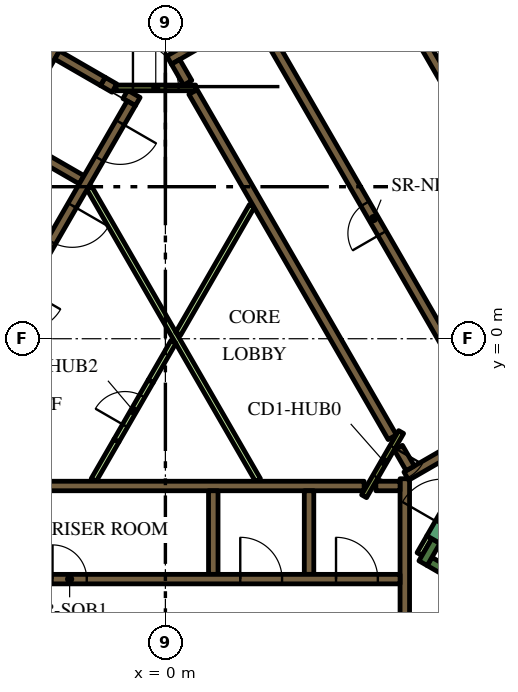
"""IFC4 building model, lengths in metres.
Left out: names, types, materials, properties, quantities, classifications, styles, units other than length and angle.
Written with IfcOpenShell. Run it as: python <this file> out.ifc"""

import sys

from ifc_helpers import new_model, si_unit, direction, frame, frame_2d, origin, place, context, subcontext, project, spatial, polyline, rectangle, outline, extrude, element, fill, save


model = new_model("IFC4")
c1 = context("Model", 3, precision=1e-05, world=origin(), true_north=direction((0.0, 1.0)))
c2 = subcontext(c1, "Body", "Model", "MODEL_VIEW")
j1 = project(units=[si_unit("LENGTHUNIT", "METRE"), si_unit("PLANEANGLEUNIT", "RADIAN")], contexts=[c1])
p1 = place(None, origin())
s1 = spatial("IfcSite", under=j1, at=p1, CompositionType="ELEMENT")
p2 = place(p1, origin())
s2 = spatial("IfcBuilding", under=s1, at=p2, CompositionType="ELEMENT")
p3 = place(p2, frame((0.0, 0.0, 122.7)))
s3 = spatial("IfcBuildingStorey", under=s2, at=p3, CompositionType="ELEMENT", Elevation=122.7)
p4 = place(p3, frame((6.776, 13.364, 0.0), z_axis=(0.0, 0.0, 1.0), x_axis=(0.500004177138, -0.8660229921, 0.0)))
e1 = element("IfcWall", 1, at=p4, inside=s3, PredefinedType="SOLIDWALL", context=c2, shape_type="SweptSolid", body=[
    extrude(rectangle(XDim=20.204, YDim=0.9, at=frame_2d((10.102, 0.0))), origin(), (0.0, 0.0, 1.0), 3.9),
])
p5 = place(p3, frame((12.84, -9.261, 0.0), z_axis=(0.0, 0.0, 1.0), x_axis=(-0.866013990052, 0.500019768644, 0.0)))
e2 = element("IfcWall", 2, at=p5, inside=s3, PredefinedType="SOLIDWALL", context=c2, shape_type="SweptSolid", body=[
    extrude(rectangle(XDim=6.8, YDim=0.25, at=frame_2d((3.4, 0.0))), origin(), (0.0, 0.0, 1.0), 3.9),
])
p6 = place(p3, frame((6.78, -5.906, 0.0), z_axis=(0.0, 0.0, 1.0), x_axis=(0.500223362819, 0.865896406789, 0.0)))
e3 = element("IfcWall", 3, at=p6, inside=s3, PredefinedType="SOLIDWALL", context=c2, shape_type="SweptSolid", body=[
    extrude(rectangle(XDim=0.675, YDim=0.25, at=frame_2d((0.337, 0.0))), origin(), (0.0, 0.0, 1.0), 3.9),
])
p7 = place(p3, frame((-5.259, -3.875, 0.0), z_axis=(0.0, 0.0, 1.0), x_axis=(1.0, 0.0, 0.0)))
e4 = element("IfcWall", 4, at=p7, inside=s3, PredefinedType="SOLIDWALL", context=c2, shape_type="SweptSolid", body=[
    extrude(rectangle(XDim=10.489, YDim=0.25, at=frame_2d((5.244, 0.0))), origin(), (0.0, 0.0, 1.0), 3.9),
])
for number, where, z_axis, x_axis in (
    (5, (3.78, -4.0, 0.0), (0.0, 0.0, 1.0), (0.0, -1.0, 0.0)),
    (6, (1.26, -4.0, 0.0), (0.0, 0.0, 1.0), (0.0, -1.0, 0.0)),
):
    element("IfcWall", number, at=place(p3, frame(where, z_axis=z_axis, x_axis=x_axis)), inside=s3, PredefinedType="SOLIDWALL", context=c2, shape_type="SweptSolid", body=[
        extrude(rectangle(XDim=2.2, YDim=0.25, at=frame_2d((1.1, 0.0))), origin(), (0.0, 0.0, 1.0), 3.9),
    ])
p8 = place(p3, frame((6.3, -7.27, 0.0), z_axis=(0.0, 0.0, 1.0), x_axis=(0.0, 1.0, 0.0)))
e7 = element("IfcWall", 7, at=p8, inside=s3, PredefinedType="SOLIDWALL", context=c2, shape_type="SweptSolid", body=[
    extrude(rectangle(XDim=3.586, YDim=0.25, at=frame_2d((1.793, 0.0))), origin(), (0.0, 0.0, 1.0), 3.9),
])
p9 = place(p3, frame((5.538, -3.875, 0.0), z_axis=(0.0, 0.0, 1.0), x_axis=(1.0, 0.0, 0.0)))
e8 = element("IfcWall", 8, at=p9, inside=s3, PredefinedType="SOLIDWALL", context=c2, shape_type="SweptSolid", body=[
    extrude(rectangle(XDim=0.637, YDim=0.25, at=frame_2d((0.318, 0.0))), origin(), (0.0, 0.0, 1.0), 3.9),
])
p10 = place(p3, frame((9.346, -1.879, 0.0), z_axis=(0.0, 0.0, 1.0), x_axis=(-0.866048528039, -0.499959945477, 0.0)))
e9 = element("IfcWall", 9, at=p10, inside=s3, PredefinedType="SOLIDWALL", context=c2, shape_type="SweptSolid", body=[
    extrude(rectangle(XDim=3.47, YDim=0.25, at=frame_2d((1.735, 0.0))), origin(), (0.0, 0.0, 1.0), 3.9),
])
p11 = place(p3, frame((6.13, -2.867, 0.0), z_axis=(0.0, 0.0, 1.0), x_axis=(0.500160776593, -0.865932559475, 0.0)))
e10 = element("IfcWall", 10, at=p11, inside=s3, PredefinedType="SOLIDWALL", context=c2, shape_type="SweptSolid", body=[
    extrude(rectangle(XDim=0.627, YDim=0.25, at=frame_2d((0.313, 0.0))), origin(), (0.0, 0.0, 1.0), 3.9),
])
p12 = place(p3, origin())
e11 = element("IfcWall", 11, at=p12, inside=s3, PredefinedType="SOLIDWALL", context=c2, shape_type="SweptSolid", body=[
    extrude(outline(polyline([(2.776, 8.733), (2.499, 8.573), (2.498, 8.573), (2.498, 8.573), (2.282, 8.448), (2.282, 8.448), (0.377, 7.348), (0.16, 7.223), (0.035, 7.439), (3.032, 9.169), (3.03, 9.152), (3.03, 9.133), (3.031, 9.113), (3.035, 9.094), (3.04, 9.075), (3.047, 9.057), (3.056, 9.039), (3.119, 8.931), (2.776, 8.733)])), origin(), (0.0, 0.0, 1.0), 3.9),
])
p13 = place(p3, frame((0.268, 7.285, 0.0), z_axis=(0.0, 0.0, 1.0), x_axis=(0.500098681536, -0.865968422476, 0.0)))
e12 = element("IfcWall", 12, at=p13, inside=s3, PredefinedType="SOLIDWALL", context=c2, shape_type="SweptSolid", body=[
    extrude(rectangle(XDim=0.636, YDim=0.25, at=frame_2d((0.318, 0.0))), origin(), (0.0, 0.0, 1.0), 3.9),
])
p14 = place(p3, frame((5.97, -2.591, 0.0), z_axis=(0.0, 0.0, 1.0), x_axis=(-0.499994469932, 0.866028596547, 0.0)))
e13 = element("IfcWall", 13, at=p14, inside=s3, PredefinedType="SOLIDWALL", context=c2, shape_type="SweptSolid", body=[
    extrude(rectangle(XDim=10.488, YDim=0.25, at=frame_2d((5.244, 0.0))), origin(), (0.0, 0.0, 1.0), 3.9),
])
p15 = place(p3, frame((-8.06, -1.311, 0.0), z_axis=(0.0, 0.0, 1.0), x_axis=(0.50000273126, 0.866023826885, 0.0)))
e14 = element("IfcWall", 14, at=p15, inside=s3, PredefinedType="SOLIDWALL", context=c2, shape_type="SweptSolid", body=[
    extrude(rectangle(XDim=10.33, YDim=0.25, at=frame_2d((5.165, 0.0))), origin(), (0.0, 0.0, 1.0), 3.9),
])
p16 = place(p3, frame((-1.342, 6.595, 0.0), z_axis=(0.0, 0.0, 1.0), x_axis=(-0.866046247233, 0.49996389635, 0.0)))
e15 = element("IfcWall", 15, at=p16, inside=s3, PredefinedType="SOLIDWALL", context=c2, shape_type="SweptSolid", body=[
    extrude(rectangle(XDim=0.35, YDim=0.25, at=frame_2d((0.175, 0.0))), origin(), (0.0, 0.0, 1.0), 3.9),
])
p17 = place(p3, frame((-1.647, 6.771, 0.0), z_axis=(0.0, 0.0, 1.0), x_axis=(-0.865971728693, 0.500092956464, 0.0)))
e16 = element("IfcWall", 16, at=p17, inside=s3, PredefinedType="SOLIDWALL", context=c2, shape_type="SweptSolid", body=[
    extrude(rectangle(XDim=1.388, YDim=0.25, at=frame_2d((0.694, 0.0))), origin(), (0.0, 0.0, 1.0), 3.9),
])
p18 = place(p3, frame((-0.728, 6.24, 0.0), z_axis=(0.0, 0.0, 1.0), x_axis=(-0.866088799389, 0.499890179513, 0.0)))
e17 = element("IfcWall", 17, at=p18, inside=s3, PredefinedType="SOLIDWALL", context=c2, shape_type="SweptSolid", body=[
    extrude(rectangle(XDim=0.378, YDim=0.25, at=frame_2d((0.189, 0.0))), origin(), (0.0, 0.0, 1.0), 3.9),
])
p19 = place(p3, frame((-2.204, 4.182, 0.0), z_axis=(0.0, 0.0, 1.0), x_axis=(-0.866008176907, 0.50002983664, 0.0)))
e18 = element("IfcWall", 18, at=p19, inside=s3, PredefinedType="SOLIDWALL", context=c2, shape_type="SweptSolid", body=[
    extrude(rectangle(XDim=2.2, YDim=0.25, at=frame_2d((1.1, 0.0))), origin(), (0.0, 0.0, 1.0), 3.9),
])
p20 = place(p3, frame((-1.887, -3.718, 0.0), z_axis=(0.0, 0.0, 1.0), x_axis=(0.500057179532, 0.865992388649, 0.0)))
e19 = element("IfcWall", 19, at=p20, inside=s3, PredefinedType="PARTITIONING", context=c2, shape_type="SweptSolid", body=[
    extrude(rectangle(XDim=1.199, YDim=0.15, at=frame_2d((0.6, 0.0))), origin(), (0.0, 0.0, 1.0), 2.75),
])
p21 = place(p3, frame((6.945, -5.222, 0.0), z_axis=(0.0, 0.0, 1.0), x_axis=(-0.499818422106, -0.866130212453, 0.0)))
e20 = element("IfcWall", 20, at=p21, inside=s3, PredefinedType="PARTITIONING", context=c2, shape_type="SweptSolid", body=[
    extrude(rectangle(XDim=0.514, YDim=0.15, at=frame_2d((0.257, 0.0))), origin(), (0.0, 0.0, 1.0), 2.75),
])
p22 = place(p3, frame((2.435, -3.718, 0.0), z_axis=(0.0, 0.0, 1.0), x_axis=(-0.499985176046, 0.866033962229, 0.0)))
e21 = element("IfcWall", 21, at=p22, inside=s3, PredefinedType="PARTITIONING", context=c2, shape_type="SweptSolid", body=[
    extrude(rectangle(XDim=8.875, YDim=0.15, at=frame_2d((4.438, 0.0))), origin(), (0.0, 0.0, 1.0), 2.75),
])
p23 = place(p3, frame((0.336, 0.132, 0.0), z_axis=(0.0, 0.0, 1.0), x_axis=(0.500001957507, 0.866024273614, 0.0)))
e22 = element("IfcWall", 22, at=p23, inside=s3, PredefinedType="PARTITIONING", context=c2, shape_type="SweptSolid", body=[
    extrude(rectangle(XDim=3.881, YDim=0.15, at=frame_2d((1.941, 0.0))), origin(), (0.0, 0.0, 1.0), 2.75),
])
p24 = place(p3, frame((-0.387, -1.121, 0.0), z_axis=(0.0, 0.0, 1.0), x_axis=(0.500057179532, 0.865992388649, 0.0)))
e23 = element("IfcWall", 23, at=p24, inside=s3, PredefinedType="PARTITIONING", context=c2, shape_type="SweptSolid", body=[
    extrude(rectangle(XDim=1.199, YDim=0.15, at=frame_2d((0.6, 0.0))), origin(), (0.0, 0.0, 1.0), 2.75),
])
p25 = place(p3, frame((-6.175, -6.325, 0.0), z_axis=(0.0, 0.0, 1.0), x_axis=(1.0, 0.0, 0.0)))
e24 = element("IfcWall", 24, at=p25, inside=s3, PredefinedType="SOLIDWALL", context=c2, shape_type="SweptSolid", body=[
    extrude(rectangle(XDim=12.35, YDim=0.25, at=frame_2d((6.175, 0.0))), origin(), (0.0, 0.0, 1.0), 3.9),
])
p26 = place(p25, frame((3.205, 0.0, 0.0)))
e25 = element("IfcOpeningElement", 25, at=p26, cuts=e24, PredefinedType="OPENING", context=c2, shape_type="SweptSolid", body=[
    extrude(rectangle(XDim=0.9, YDim=2.1, at=frame_2d((0.45, 1.05))), frame((0.0, 0.135, 0.0), z_axis=(0.0, -1.0, 0.0), x_axis=(1.0, 0.0, 0.0)), (0.0, 0.0, 1.0), 0.27),
])
p27 = place(p25, frame((8.145, 0.0, 0.0)))
e26 = element("IfcOpeningElement", 26, at=p27, cuts=e24, PredefinedType="OPENING", context=c2, shape_type="SweptSolid", body=[
    extrude(rectangle(XDim=1.1, YDim=2.1, at=frame_2d((0.55, 1.05))), frame((0.0, 0.135, 0.0), z_axis=(0.0, -1.0, 0.0), x_axis=(1.0, 0.0, 0.0)), (0.0, 0.0, 1.0), 0.27),
])
p28 = place(p25, frame((10.665, 0.0, 0.0)))
e27 = element("IfcOpeningElement", 27, at=p28, cuts=e24, PredefinedType="OPENING", context=c2, shape_type="SweptSolid", body=[
    extrude(rectangle(XDim=1.1, YDim=2.1, at=frame_2d((0.55, 1.05))), frame((0.0, 0.135, 0.0), z_axis=(0.0, -1.0, 0.0), x_axis=(1.0, 0.0, 0.0)), (0.0, 0.0, 1.0), 0.27),
])
p29 = place(p3, frame((11.553, -0.46, 0.0), z_axis=(0.0, 0.0, 1.0), x_axis=(-0.500006514828, 0.866021642414, 0.0)))
e28 = element("IfcWall", 28, at=p29, inside=s3, PredefinedType="SOLIDWALL", context=c2, shape_type="SweptSolid", body=[
    extrude(rectangle(XDim=12.35, YDim=0.25, at=frame_2d((6.175, 0.0))), origin(), (0.0, 0.0, 1.0), 3.9),
])
p30 = place(p29, frame((0.585, 0.0, 0.0)))
e29 = element("IfcOpeningElement", 29, at=p30, cuts=e28, PredefinedType="OPENING", context=c2, shape_type="SweptSolid", body=[
    extrude(rectangle(XDim=1.1, YDim=2.1, at=frame_2d((0.55, 1.05))), frame((0.0, 0.135, 0.0), z_axis=(0.0, -1.0, 0.0), x_axis=(1.0, 0.0, 0.0)), (0.0, 0.0, 1.0), 0.27),
])
p31 = place(p29, frame((3.105, 0.0, 0.0)))
e30 = element("IfcOpeningElement", 30, at=p31, cuts=e28, PredefinedType="OPENING", context=c2, shape_type="SweptSolid", body=[
    extrude(rectangle(XDim=1.1, YDim=2.1, at=frame_2d((0.55, 1.05))), frame((0.0, 0.135, 0.0), z_axis=(0.0, -1.0, 0.0), x_axis=(1.0, 0.0, 0.0)), (0.0, 0.0, 1.0), 0.27),
])
p32 = place(p29, frame((5.625, 0.0, 0.0)))
e31 = element("IfcOpeningElement", 31, at=p32, cuts=e28, PredefinedType="OPENING", context=c2, shape_type="SweptSolid", body=[
    extrude(rectangle(XDim=1.1, YDim=2.1, at=frame_2d((0.55, 1.05))), frame((0.0, 0.135, 0.0), z_axis=(0.0, -1.0, 0.0), x_axis=(1.0, 0.0, 0.0)), (0.0, 0.0, 1.0), 0.27),
])
p33 = place(p3, frame((8.565, -2.185, 0.0), z_axis=(0.0, 0.0, 1.0), x_axis=(-0.499997954832, 0.866026584559, 0.0)))
e32 = element("IfcWall", 32, at=p33, inside=s3, PredefinedType="SOLIDWALL", context=c2, shape_type="SweptSolid", body=[
    extrude(rectangle(XDim=12.35, YDim=0.25, at=frame_2d((6.175, 0.0))), origin(), (0.0, 0.0, 1.0), 3.9),
])
p34 = place(p33, frame((5.725, 0.0, 0.0)))
e33 = element("IfcOpeningElement", 33, at=p34, cuts=e32, PredefinedType="OPENING", context=c2, shape_type="SweptSolid", body=[
    extrude(rectangle(XDim=0.9, YDim=2.1, at=frame_2d((0.45, 1.05))), frame((0.0, 0.135, 0.0), z_axis=(0.0, -1.0, 0.0), x_axis=(1.0, 0.0, 0.0)), (0.0, 0.0, 1.0), 0.27),
])
p35 = place(p3, frame((-0.898, 6.194, 0.0), z_axis=(0.0, 0.0, 1.0), x_axis=(-0.499996202215, -0.866027596426, 0.0)))
e34 = element("IfcWall", 34, at=p35, inside=s3, PredefinedType="SOLIDWALL", context=c2, shape_type="SweptSolid", body=[
    extrude(rectangle(XDim=9.83, YDim=0.25, at=frame_2d((4.915, 0.0))), origin(), (0.0, 0.0, 1.0), 3.9),
])
p36 = place(p35, frame((0.585, 0.0, 0.0)))
e35 = element("IfcOpeningElement", 35, at=p36, cuts=e34, PredefinedType="OPENING", context=c2, shape_type="SweptSolid", body=[
    extrude(rectangle(XDim=1.1, YDim=2.1, at=frame_2d((0.55, 1.05))), frame((0.0, 0.135, 0.0), z_axis=(0.0, -1.0, 0.0), x_axis=(1.0, 0.0, 0.0)), (0.0, 0.0, 1.0), 0.27),
])
p37 = place(p35, frame((3.105, 0.0, 0.0)))
e36 = element("IfcOpeningElement", 36, at=p37, cuts=e34, PredefinedType="OPENING", context=c2, shape_type="SweptSolid", body=[
    extrude(rectangle(XDim=1.1, YDim=2.1, at=frame_2d((0.55, 1.05))), frame((0.0, 0.135, 0.0), z_axis=(0.0, -1.0, 0.0), x_axis=(1.0, 0.0, 0.0)), (0.0, 0.0, 1.0), 0.27),
])
p38 = place(p35, frame((5.625, 0.0, 0.0)))
e37 = element("IfcOpeningElement", 37, at=p38, cuts=e34, PredefinedType="OPENING", context=c2, shape_type="SweptSolid", body=[
    extrude(rectangle(XDim=1.1, YDim=2.1, at=frame_2d((0.55, 1.05))), frame((0.0, 0.135, 0.0), z_axis=(0.0, -1.0, 0.0), x_axis=(1.0, 0.0, 0.0)), (0.0, 0.0, 1.0), 0.27),
])
p39 = place(p35, frame((8.145, 0.0, 0.0)))
e38 = element("IfcOpeningElement", 38, at=p39, cuts=e34, PredefinedType="OPENING", context=c2, shape_type="SweptSolid", body=[
    extrude(rectangle(XDim=1.1, YDim=2.1, at=frame_2d((0.55, 1.05))), frame((0.0, 0.135, 0.0), z_axis=(0.0, -1.0, 0.0), x_axis=(1.0, 0.0, 0.0)), (0.0, 0.0, 1.0), 0.27),
])
p40 = place(p3, frame((7.053, -5.284, 0.0), z_axis=(0.0, 0.0, 1.0), x_axis=(0.500078061341, 0.865980330357, 0.0)))
e39 = element("IfcWall", 39, at=p40, inside=s3, PredefinedType="SOLIDWALL", context=c2, shape_type="SweptSolid", body=[
    extrude(rectangle(XDim=2.1, YDim=0.4, at=frame_2d((1.05, 0.0))), origin(), (0.0, 0.0, 1.0), 3.9),
])
p41 = place(p40, frame((0.45, 0.0, 0.0)))
e40 = element("IfcOpeningElement", 40, at=p41, cuts=e39, PredefinedType="OPENING", context=c2, shape_type="SweptSolid", body=[
    extrude(rectangle(XDim=1.2, YDim=2.1, at=frame_2d((0.6, 1.05))), frame((0.0, 0.21, 0.0), z_axis=(0.0, -1.0, 0.0), x_axis=(1.0, 0.0, 0.0)), (0.0, 0.0, 1.0), 0.42),
])
p42 = place(p3, frame((6.203, -2.456, 0.0), z_axis=(0.0, 0.0, 1.0), x_axis=(-0.500043961785, -0.866000020948, 0.0)))
e41 = element("IfcWall", 41, at=p42, inside=s3, PredefinedType="PARTITIONING", context=c2, shape_type="SweptSolid", body=[
    extrude(rectangle(XDim=1.95, YDim=0.15, at=frame_2d((0.975, 0.0))), origin(), (0.0, 0.0, 1.0), 3.9),
])
p43 = place(p42, frame((0.45, 0.0, 0.0)))
e42 = element("IfcOpeningElement", 42, at=p43, cuts=e41, PredefinedType="OPENING", context=c2, shape_type="SweptSolid", body=[
    extrude(rectangle(XDim=0.9, YDim=2.1, at=frame_2d((0.45, 1.05))), frame((0.0, 0.085, 0.0), z_axis=(0.0, -1.0, 0.0), x_axis=(1.0, 0.0, 0.0)), (0.0, 0.0, 1.0), 0.17),
])
p44 = place(p3, frame((-1.303, 6.6, 0.0), z_axis=(0.0, 0.0, 1.0), x_axis=(1.0, 0.0, 0.0)))
e43 = element("IfcWall", 43, at=p44, inside=s3, PredefinedType="PARTITIONING", context=c2, shape_type="SweptSolid", body=[
    extrude(rectangle(XDim=2.1, YDim=0.15, at=frame_2d((1.05, 0.0))), origin(), (0.0, 0.0, 1.0), 3.9),
])
p45 = place(p44, frame((0.45, 0.0, 0.0)))
e44 = element("IfcOpeningElement", 44, at=p45, cuts=e43, PredefinedType="OPENING", context=c2, shape_type="SweptSolid", body=[
    extrude(rectangle(XDim=1.2, YDim=2.1, at=frame_2d((0.6, 1.05))), frame((0.0, 0.085, 0.0), z_axis=(0.0, -1.0, 0.0), x_axis=(1.0, 0.0, 0.0)), (0.0, 0.0, 1.0), 0.17),
])
p46 = place(p3, frame((-1.287, -2.679, 0.0), z_axis=(0.0, 0.0, 1.0), x_axis=(0.499961193289, 0.866047807691, 0.0)))
e45 = element("IfcWall", 45, at=p46, inside=s3, PredefinedType="PARTITIONING", context=c2, shape_type="SweptSolid", body=[
    extrude(rectangle(XDim=1.8, YDim=0.15, at=frame_2d((0.9, 0.0))), origin(), (0.0, 0.0, 1.0), 2.75),
])
p47 = place(p46, frame((0.45, 0.0, 0.0)))
e46 = element("IfcOpeningElement", 46, at=p47, cuts=e45, PredefinedType="OPENING", context=c2, shape_type="SweptSolid", body=[
    extrude(rectangle(XDim=0.9, YDim=2.1, at=frame_2d((0.45, 1.05))), frame((0.0, 0.085, 0.0), z_axis=(0.0, -1.0, 0.0), x_axis=(1.0, 0.0, 0.0)), (0.0, 0.0, 1.0), 0.17),
])
p48 = place(p3, frame((6.163, 18.475, 0.0), z_axis=(0.0, 0.0, 1.0), x_axis=(0.500001317485, -0.866024643133, 0.0)))
e47 = element("IfcWall", 47, at=p48, inside=s3, PredefinedType="PARTITIONING", context=c2, shape_type="SweptSolid", body=[
    extrude(rectangle(XDim=25.767, YDim=0.15, at=frame_2d((12.883, 0.0))), origin(), (0.0, 0.0, 1.0), 2.75),
])
p49 = place(p48, frame((19.306, 0.0, 0.0)))
e48 = element("IfcOpeningElement", 48, at=p49, cuts=e47, PredefinedType="OPENING", context=c2, shape_type="SweptSolid", body=[
    extrude(rectangle(XDim=1.0, YDim=2.1, at=frame_2d((0.5, 1.05))), frame((0.0, 0.085, 0.0), z_axis=(0.0, -1.0, 0.0), x_axis=(1.0, 0.0, 0.0)), (0.0, 0.0, 1.0), 0.17),
])
p50 = place(p48, frame((17.999, 0.0, 0.0)))
e49 = element("IfcOpeningElement", 49, at=p50, cuts=e47, PredefinedType="OPENING", context=c2, shape_type="SweptSolid", body=[
    extrude(rectangle(XDim=1.0, YDim=2.1, at=frame_2d((0.5, 1.05))), frame((0.0, 0.085, 0.0), z_axis=(0.0, -1.0, 0.0), x_axis=(1.0, 0.0, 0.0)), (0.0, 0.0, 1.0), 0.17),
])
p51 = place(p48, frame((0.596, 0.0, 0.0)))
e50 = element("IfcOpeningElement", 50, at=p51, cuts=e47, PredefinedType="OPENING", context=c2, shape_type="SweptSolid", body=[
    extrude(rectangle(XDim=1.0, YDim=2.1, at=frame_2d((0.5, 1.05))), frame((0.0, 0.085, 0.0), z_axis=(0.0, -1.0, 0.0), x_axis=(1.0, 0.0, 0.0)), (0.0, 0.0, 1.0), 0.17),
])
p52 = place(p26, origin())
e51 = element("IfcDoor", 51, at=p52, inside=s3, OperationType="SINGLE_SWING_LEFT", PredefinedType="DOOR", context=c2, shape_type="SweptSolid", body=[
    extrude(rectangle(XDim=0.9, YDim=2.1, at=frame_2d((0.45, 1.05))), frame((0.0, 0.025, 0.0), z_axis=(0.0, -1.0, 0.0), x_axis=(1.0, 0.0, 0.0)), (0.0, 0.0, 1.0), 0.05),
])
fill(e25, e51)
p53 = place(p27, origin())
e52 = element("IfcDoor", 52, at=p53, inside=s3, OperationType="DOUBLE_DOOR_SLIDING", PredefinedType="DOOR", context=c2, shape_type="SweptSolid", body=[
    extrude(rectangle(XDim=1.1, YDim=2.1, at=frame_2d((0.55, 1.05))), frame((0.0, 0.025, 0.0), z_axis=(0.0, -1.0, 0.0), x_axis=(1.0, 0.0, 0.0)), (0.0, 0.0, 1.0), 0.05),
])
fill(e26, e52)
p54 = place(p28, origin())
e53 = element("IfcDoor", 53, at=p54, inside=s3, OperationType="DOUBLE_DOOR_SLIDING", PredefinedType="DOOR", context=c2, shape_type="SweptSolid", body=[
    extrude(rectangle(XDim=1.1, YDim=2.1, at=frame_2d((0.55, 1.05))), frame((0.0, 0.025, 0.0), z_axis=(0.0, -1.0, 0.0), x_axis=(1.0, 0.0, 0.0)), (0.0, 0.0, 1.0), 0.05),
])
fill(e27, e53)
p55 = place(p34, origin())
e54 = element("IfcDoor", 54, at=p55, inside=s3, OperationType="SINGLE_SWING_LEFT", PredefinedType="DOOR", context=c2, shape_type="SweptSolid", body=[
    extrude(rectangle(XDim=0.9, YDim=2.1, at=frame_2d((0.45, 1.05))), frame((0.0, 0.025, 0.0), z_axis=(0.0, -1.0, 0.0), x_axis=(1.0, 0.0, 0.0)), (0.0, 0.0, 1.0), 0.05),
])
fill(e33, e54)
p56 = place(p36, origin())
e55 = element("IfcDoor", 55, at=p56, inside=s3, OperationType="DOUBLE_DOOR_SLIDING", PredefinedType="DOOR", context=c2, shape_type="SweptSolid", body=[
    extrude(rectangle(XDim=1.1, YDim=2.1, at=frame_2d((0.55, 1.05))), frame((0.0, 0.025, 0.0), z_axis=(0.0, -1.0, 0.0), x_axis=(1.0, 0.0, 0.0)), (0.0, 0.0, 1.0), 0.05),
])
fill(e35, e55)
p57 = place(p37, origin())
e56 = element("IfcDoor", 56, at=p57, inside=s3, OperationType="DOUBLE_DOOR_SLIDING", PredefinedType="DOOR", context=c2, shape_type="SweptSolid", body=[
    extrude(rectangle(XDim=1.1, YDim=2.1, at=frame_2d((0.55, 1.05))), frame((0.0, 0.025, 0.0), z_axis=(0.0, -1.0, 0.0), x_axis=(1.0, 0.0, 0.0)), (0.0, 0.0, 1.0), 0.05),
])
fill(e36, e56)
p58 = place(p43, origin())
e57 = element("IfcDoor", 57, at=p58, inside=s3, OperationType="SINGLE_SWING_LEFT", PredefinedType="DOOR", context=c2, shape_type="SweptSolid", body=[
    extrude(rectangle(XDim=0.9, YDim=2.1, at=frame_2d((0.45, 1.05))), frame((0.0, 0.025, 0.0), z_axis=(0.0, -1.0, 0.0), x_axis=(1.0, 0.0, 0.0)), (0.0, 0.0, 1.0), 0.05),
])
fill(e42, e57)
p59 = place(p45, origin())
e58 = element("IfcDoor", 58, at=p59, inside=s3, OperationType="SINGLE_SWING_LEFT", PredefinedType="DOOR", context=c2, shape_type="SweptSolid", body=[
    extrude(rectangle(XDim=1.2, YDim=2.1, at=frame_2d((0.6, 1.05))), frame((0.0, 0.025, 0.0), z_axis=(0.0, -1.0, 0.0), x_axis=(1.0, 0.0, 0.0)), (0.0, 0.0, 1.0), 0.05),
])
fill(e44, e58)
p60 = place(p47, origin())
e59 = element("IfcDoor", 59, at=p60, inside=s3, OperationType="SINGLE_SWING_LEFT", PredefinedType="DOOR", context=c2, shape_type="SweptSolid", body=[
    extrude(rectangle(XDim=0.9, YDim=2.1, at=frame_2d((0.45, 1.05))), frame((0.0, 0.025, 0.0), z_axis=(0.0, -1.0, 0.0), x_axis=(1.0, 0.0, 0.0)), (0.0, 0.0, 1.0), 0.05),
])
fill(e46, e59)
save(model, sys.argv[1])
